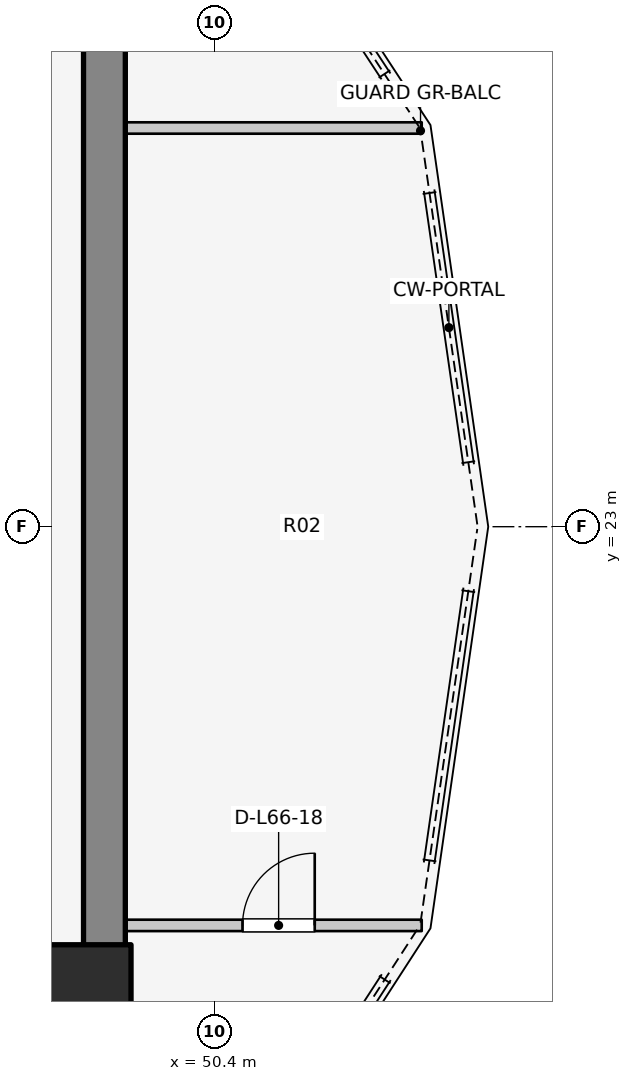
"""IFC4 building model, lengths in metres.
Left out: names, types, materials, properties, quantities, classifications, styles, units other than length and angle.
Written with IfcOpenShell. Run it as: python <this file> out.ifc"""

import sys

from ifc_helpers import new_model, si_unit, direction, frame, frame_2d, origin, origin_2d, place, context, subcontext, project, spatial, rectangle, extrude, element, fill, save


model = new_model("IFC4")
c1 = context("Model", 3, precision=1e-05, world=origin(), true_north=direction((0.0, 1.0)))
c2 = subcontext(c1, "Body", "Model", "MODEL_VIEW")
j1 = project(units=[si_unit("LENGTHUNIT", "METRE"), si_unit("PLANEANGLEUNIT", "RADIAN")], contexts=[c1])
p1 = place(None, origin())
s1 = spatial("IfcSite", under=j1, at=p1, CompositionType="ELEMENT")
p2 = place(p1, origin())
s2 = spatial("IfcBuilding", under=s1, at=p2, CompositionType="ELEMENT")
p3 = place(p2, frame((0.0, 0.0, 217.1)))
s3 = spatial("IfcBuildingStorey", under=s2, at=p3, CompositionType="ELEMENT", Elevation=217.1)
p4 = place(p3, frame((48.95, 17.05, 0.0), z_axis=(0.0, 0.0, 1.0), x_axis=(0.0, 1.0, 0.0)))
e1 = element("IfcWall", 1, at=p4, inside=s3, PredefinedType="SHEAR", context=c2, shape_type="SweptSolid", body=[
    extrude(rectangle(XDim=12.8, YDim=0.55, at=frame_2d((6.4, 0.0))), origin(), (0.0, 0.0, 1.0), 3.1),
])
p5 = place(p3, frame((48.7, 16.9, 0.0), z_axis=(0.0, 0.0, 1.0), x_axis=(1.0, 0.0, 0.0)))
e2 = element("IfcColumn", 2, at=p5, inside=s3, PredefinedType="COLUMN", context=c2, shape_type="SweptSolid", body=[
    extrude(rectangle(XDim=1.2, YDim=1.2, at=origin_2d()), origin(), (0.0, 0.0, 1.0), 3.1),
])
p6 = place(p3, frame((48.95, 17.755, 0.0), z_axis=(0.0, 0.0, 1.0), x_axis=(1.0, 0.0, 0.0)))
e3 = element("IfcWall", 3, at=p6, inside=s3, PredefinedType="PARTITIONING", context=c2, shape_type="SweptSolid", body=[
    extrude(rectangle(XDim=4.175, YDim=0.15, at=frame_2d((2.087, 0.0))), origin(), (0.0, 0.0, 1.0), 2.575),
])
p7 = place(p6, frame((1.817, 0.0, 0.0)))
e4 = element("IfcOpeningElement", 4, at=p7, cuts=e3, PredefinedType="OPENING", context=c2, shape_type="SweptSolid", body=[
    extrude(rectangle(XDim=0.95, YDim=2.1, at=frame_2d((0.475, 1.05))), frame((0.0, 0.085, 0.0), z_axis=(0.0, -1.0, 0.0), x_axis=(1.0, 0.0, 0.0)), (0.0, 0.0, 1.0), 0.17),
])
p8 = place(p3, frame((48.95, 28.245, 0.0), z_axis=(0.0, 0.0, 1.0), x_axis=(1.0, 0.0, 0.0)))
e5 = element("IfcWall", 5, at=p8, inside=s3, PredefinedType="PARTITIONING", context=c2, shape_type="SweptSolid", body=[
    extrude(rectangle(XDim=4.175, YDim=0.15, at=frame_2d((2.087, 0.0))), origin(), (0.0, 0.0, 1.0), 2.575),
])
p9 = place(p7, origin())
e6 = element("IfcDoor", 6, at=p9, inside=s3, OperationType="SINGLE_SWING_RIGHT", PredefinedType="DOOR", context=c2, shape_type="SweptSolid", body=[
    extrude(rectangle(XDim=0.95, YDim=2.1, at=frame_2d((0.475, 1.05))), frame((0.0, 0.025, 0.0), z_axis=(0.0, -1.0, 0.0), x_axis=(1.0, 0.0, 0.0)), (0.0, 0.0, 1.0), 0.05),
])
fill(e4, e6)
save(model, sys.argv[1])
